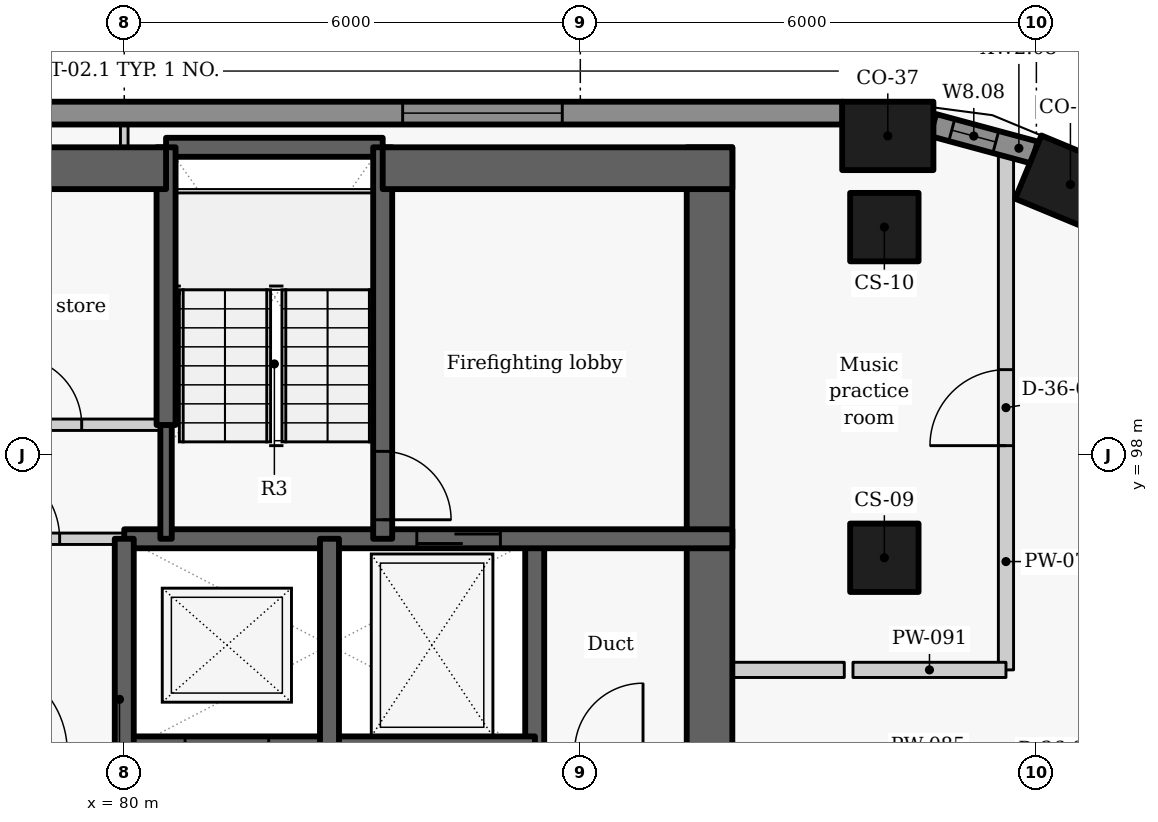
"""IFC4 building model, lengths in metres.
Left out: names, types, materials, properties, quantities, classifications, styles, units other than length and angle.
Written with IfcOpenShell. Run it as: python <this file> out.ifc"""

import sys

from ifc_helpers import new_model, si_unit, direction, frame, frame_2d, origin, origin_2d, place, context, subcontext, project, spatial, rectangle, extrude, element, fill, save


model = new_model("IFC4")
c1 = context("Model", 3, precision=1e-05, world=origin(), true_north=direction((0.0, 1.0)))
c2 = subcontext(c1, "Body", "Model", "MODEL_VIEW")
j1 = project(units=[si_unit("LENGTHUNIT", "METRE"), si_unit("PLANEANGLEUNIT", "RADIAN")], contexts=[c1])
p1 = place(None, origin())
s1 = spatial("IfcSite", under=j1, at=p1, CompositionType="ELEMENT")
p2 = place(p1, origin())
s2 = spatial("IfcBuilding", under=s1, at=p2, CompositionType="ELEMENT")
p3 = place(p2, frame((0.0, 0.0, 216.3)))
s3 = spatial("IfcBuildingStorey", under=s2, at=p3, CompositionType="ELEMENT", Elevation=216.3)
for number, where, z_axis, x_axis in (
    (1, (92.448, 101.56, 0.0), (0.0, 0.0, 1.0), (-0.924, 0.383, 0.0)),
    (2, (90.045, 102.2, 0.0), (0.0, 0.0, 1.0), (-1.0, 0.0, 0.0)),
):
    element("IfcColumn", number, at=place(p3, frame(where, z_axis=z_axis, x_axis=x_axis)), inside=s3, PredefinedType="COLUMN", context=c2, shape_type="SweptSolid", body=[
        extrude(rectangle(XDim=1.2, YDim=0.9, at=origin_2d()), origin(), (0.0, 0.0, 1.0), 3.3),
    ])
for number, where, z_axis, x_axis in (
    (3, (90.0, 96.65, 0.0), (0.0, 0.0, 1.0), (0.0, 1.0, 0.0)),
    (4, (90.0, 101.0, 0.0), (0.0, 0.0, 1.0), (0.0, 1.0, 0.0)),
):
    element("IfcColumn", number, at=place(p3, frame(where, z_axis=z_axis, x_axis=x_axis)), inside=s3, PredefinedType="COLUMN", context=c2, shape_type="SweptSolid", body=[
        extrude(rectangle(XDim=0.9, YDim=0.9, at=origin_2d()), origin(), (0.0, 0.0, 1.0), 3.3),
    ])
p4 = place(p3, frame((91.977, 101.981, 0.0), z_axis=(0.0, 0.0, 1.0), x_axis=(-0.965315341278, 0.261086751661, 0.0)))
e5 = element("IfcWall", 5, at=p4, inside=s3, PredefinedType="SOLIDWALL", context=c2, shape_type="SweptSolid", body=[
    extrude(rectangle(XDim=1.384, YDim=0.3, at=frame_2d((0.692, 0.0))), origin(), (0.0, 0.0, 1.0), 2.05),
])
p5 = place(p4, frame((0.529, 0.0, 0.9)))
e6 = element("IfcOpeningElement", 6, at=p5, cuts=e5, PredefinedType="OPENING", context=c2, shape_type="SweptSolid", body=[
    extrude(rectangle(XDim=0.6, YDim=1.1, at=frame_2d((0.3, 0.55))), frame((0.0, 0.16, 0.0), z_axis=(0.0, -1.0, 0.0), x_axis=(1.0, 0.0, 0.0)), (0.0, 0.0, 1.0), 0.32),
])
p6 = place(p3, frame((89.449, 102.5, 0.0), z_axis=(0.0, 0.0, 1.0), x_axis=(-1.0, 0.0, 0.0)))
e7 = element("IfcWall", 7, at=p6, inside=s3, PredefinedType="SOLIDWALL", context=c2, shape_type="SweptSolid", body=[
    extrude(rectangle(XDim=18.933, YDim=0.3, at=frame_2d((9.466, 0.0))), origin(), (0.0, 0.0, 1.0), 2.05),
])
p7 = place(p6, frame((3.687, 0.0, 0.9)))
e8 = element("IfcOpeningElement", 8, at=p7, cuts=e7, PredefinedType="OPENING", context=c2, shape_type="SweptSolid", body=[
    extrude(rectangle(XDim=2.1, YDim=1.1, at=frame_2d((1.05, 0.55))), frame((0.0, 0.16, 0.0), z_axis=(0.0, -1.0, 0.0), x_axis=(1.0, 0.0, 0.0)), (0.0, 0.0, 1.0), 0.32),
])
p8 = place(p6, frame((13.118, 0.0, 0.9)))
e9 = element("IfcOpeningElement", 9, at=p8, cuts=e7, PredefinedType="OPENING", context=c2, shape_type="SweptSolid", body=[
    extrude(rectangle(XDim=2.1, YDim=1.1, at=frame_2d((1.05, 0.55))), frame((0.0, 0.16, 0.0), z_axis=(0.0, -1.0, 0.0), x_axis=(1.0, 0.0, 0.0)), (0.0, 0.0, 1.0), 0.32),
])
p9 = place(p3, frame((85.4, 94.1, -0.275), z_axis=(0.0, 0.0, 1.0), x_axis=(0.0, 1.0, 0.0)))
e10 = element("IfcWall", 10, at=p9, inside=s3, PredefinedType="SHEAR", context=c2, shape_type="SweptSolid", body=[
    extrude(rectangle(XDim=2.8, YDim=0.25, at=frame_2d((1.4, 0.0))), origin(), (0.0, 0.0, 1.0), 3.225),
])
p10 = place(p3, frame((87.7, 102.05, -0.275), z_axis=(0.0, 0.0, 1.0), x_axis=(0.0, -1.0, 0.0)))
e11 = element("IfcWall", 11, at=p10, inside=s3, PredefinedType="SHEAR", context=c2, shape_type="SweptSolid", body=[
    extrude(rectangle(XDim=14.25, YDim=0.6, at=frame_2d((7.125, 0.0))), origin(), (0.0, 0.0, 1.0), 3.225),
])
p11 = place(p10, frame((8.898, 0.0, 0.275)))
e12 = element("IfcOpeningElement", 12, at=p11, cuts=e11, PredefinedType="OPENING", context=c2, shape_type="SweptSolid", body=[
    extrude(rectangle(XDim=1.5, YDim=2.1, at=frame_2d((0.75, 1.05))), frame((0.0, 0.31, 0.0), z_axis=(0.0, -1.0, 0.0), x_axis=(1.0, 0.0, 0.0)), (0.0, 0.0, 1.0), 0.62),
])
p12 = place(p3, frame((79.997, 94.1, -0.275), z_axis=(0.0, 0.0, 1.0), x_axis=(1.0, 0.0, 0.0)))
e13 = element("IfcWall", 13, at=p12, inside=s3, PredefinedType="SHEAR", context=c2, shape_type="SweptSolid", body=[
    extrude(rectangle(XDim=5.406, YDim=0.4, at=frame_2d((2.703, 0.0))), origin(), (0.0, 0.0, 1.0), 3.225),
])
p13 = place(p12, frame((0.803, 0.0, 0.275)))
e14 = element("IfcOpeningElement", 14, at=p13, cuts=e13, PredefinedType="OPENING", context=c2, shape_type="SweptSolid", body=[
    extrude(rectangle(XDim=1.1, YDim=2.1, at=frame_2d((0.55, 1.05))), frame((0.0, 0.21, 0.0), z_axis=(0.0, -1.0, 0.0), x_axis=(1.0, 0.0, 0.0)), (0.0, 0.0, 1.0), 0.42),
])
p14 = place(p3, frame((80.0, 96.9, -0.275), z_axis=(0.0, 0.0, 1.0), x_axis=(1.0, 0.0, 0.0)))
e15 = element("IfcWall", 15, at=p14, inside=s3, PredefinedType="SHEAR", context=c2, shape_type="SweptSolid", body=[
    extrude(rectangle(XDim=8.0, YDim=0.25, at=frame_2d((4.0, 0.0))), origin(), (0.0, 0.0, 1.0), 3.225),
])
p15 = place(p14, frame((3.849, 0.0, 0.275)))
e16 = element("IfcOpeningElement", 16, at=p15, cuts=e15, PredefinedType="OPENING", context=c2, shape_type="SweptSolid", body=[
    extrude(rectangle(XDim=1.1, YDim=2.1, at=frame_2d((0.55, 1.05))), frame((0.0, 0.135, 0.0), z_axis=(0.0, -1.0, 0.0), x_axis=(1.0, 0.0, 0.0)), (0.0, 0.0, 1.0), 0.27),
])
p16 = place(p3, frame((80.0, 94.1, -0.275), z_axis=(0.0, 0.0, 1.0), x_axis=(0.0, 1.0, 0.0)))
e17 = element("IfcWall", 17, at=p16, inside=s3, PredefinedType="SHEAR", context=c2, shape_type="SweptSolid", body=[
    extrude(rectangle(XDim=2.8, YDim=0.25, at=frame_2d((1.4, 0.0))), origin(), (0.0, 0.0, 1.0), 3.225),
])
p17 = place(p3, frame((77.3, 96.9, 0.0), z_axis=(0.0, 0.0, 1.0), x_axis=(1.0, 0.0, 0.0)))
e18 = element("IfcWall", 18, at=p17, inside=s3, PredefinedType="PARTITIONING", context=c2, shape_type="SweptSolid", body=[
    extrude(rectangle(XDim=2.7, YDim=0.15, at=frame_2d((1.35, 0.0))), origin(), (0.0, 0.0, 1.0), 2.95),
])
p18 = place(p17, frame((0.85, 0.0, 0.0)))
e19 = element("IfcOpeningElement", 19, at=p18, cuts=e18, PredefinedType="OPENING", context=c2, shape_type="SweptSolid", body=[
    extrude(rectangle(XDim=1.0, YDim=2.1, at=frame_2d((0.5, 1.05))), frame((0.0, 0.085, 0.0), z_axis=(0.0, -1.0, 0.0), x_axis=(1.0, 0.0, 0.0)), (0.0, 0.0, 1.0), 0.17),
])
p19 = place(p3, frame((82.7, 94.1, -0.275), z_axis=(0.0, 0.0, 1.0), x_axis=(0.0, 1.0, 0.0)))
e20 = element("IfcWall", 20, at=p19, inside=s3, PredefinedType="SHEAR", context=c2, shape_type="SweptSolid", body=[
    extrude(rectangle(XDim=2.8, YDim=0.25, at=frame_2d((1.4, 0.0))), origin(), (0.0, 0.0, 1.0), 3.225),
])
p20 = place(p3, frame((80.55, 102.05, -0.275), z_axis=(0.0, 0.0, 1.0), x_axis=(1.0, 0.0, 0.0)))
e21 = element("IfcWall", 21, at=p20, inside=s3, PredefinedType="SHEAR", context=c2, shape_type="SweptSolid", body=[
    extrude(rectangle(XDim=2.85, YDim=0.25, at=frame_2d((1.425, 0.0))), origin(), (0.0, 0.0, 1.0), 3.225),
])
p21 = place(p3, frame((83.4, 102.05, -0.275), z_axis=(0.0, 0.0, 1.0), x_axis=(0.0, -1.0, 0.0)))
e22 = element("IfcWall", 22, at=p21, inside=s3, PredefinedType="SHEAR", context=c2, shape_type="SweptSolid", body=[
    extrude(rectangle(XDim=5.15, YDim=0.25, at=frame_2d((2.575, 0.0))), origin(), (0.0, 0.0, 1.0), 3.225),
])
p22 = place(p21, frame((4.0, 0.0, 0.275)))
e23 = element("IfcOpeningElement", 23, at=p22, cuts=e22, PredefinedType="OPENING", context=c2, shape_type="SweptSolid", body=[
    extrude(rectangle(XDim=0.9, YDim=2.1, at=frame_2d((0.45, 1.05))), frame((0.0, 0.135, 0.0), z_axis=(0.0, -1.0, 0.0), x_axis=(1.0, 0.0, 0.0)), (0.0, 0.0, 1.0), 0.27),
])
p23 = place(p3, frame((80.55, 96.9, -0.275), z_axis=(0.0, 0.0, 1.0), x_axis=(0.0, 1.0, 0.0)))
e24 = element("IfcWall", 24, at=p23, inside=s3, PredefinedType="SHEAR", context=c2, shape_type="SweptSolid", body=[
    extrude(rectangle(XDim=1.503, YDim=0.15, at=frame_2d((0.751, 0.0))), origin(), (0.0, 0.0, 1.0), 3.225),
])
p24 = place(p3, frame((80.55, 98.397, -0.275), z_axis=(0.0, 0.0, 1.0), x_axis=(0.0, 1.0, 0.0)))
e25 = element("IfcWall", 25, at=p24, inside=s3, PredefinedType="SHEAR", context=c2, shape_type="SweptSolid", body=[
    extrude(rectangle(XDim=3.653, YDim=0.25, at=frame_2d((1.827, 0.0))), origin(), (0.0, 0.0, 1.0), 3.225),
])
p25 = place(p3, frame((75.35, 101.775, -0.275), z_axis=(0.0, 0.0, 1.0), x_axis=(1.0, 0.0, 0.0)))
e26 = element("IfcWall", 26, at=p25, inside=s3, PredefinedType="SHEAR", context=c2, shape_type="SweptSolid", body=[
    extrude(rectangle(XDim=5.2, YDim=0.55, at=frame_2d((2.6, 0.0))), origin(), (0.0, 0.0, 1.0), 3.225),
])
p26 = place(p3, frame((83.4, 101.775, -0.275), z_axis=(0.0, 0.0, 1.0), x_axis=(1.0, 0.0, 0.0)))
e27 = element("IfcWall", 27, at=p26, inside=s3, PredefinedType="SHEAR", context=c2, shape_type="SweptSolid", body=[
    extrude(rectangle(XDim=4.6, YDim=0.55, at=frame_2d((2.3, 0.0))), origin(), (0.0, 0.0, 1.0), 3.225),
])
p27 = place(p3, frame((75.35, 98.4, 0.0), z_axis=(0.0, 0.0, 1.0), x_axis=(1.0, 0.0, 0.0)))
e28 = element("IfcWall", 28, at=p27, inside=s3, PredefinedType="PARTITIONING", context=c2, shape_type="SweptSolid", body=[
    extrude(rectangle(XDim=5.2, YDim=0.15, at=frame_2d((2.6, 0.0))), origin(), (0.0, 0.0, 1.0), 2.95),
])
p28 = place(p27, frame((0.59, 0.0, 0.0)))
e29 = element("IfcOpeningElement", 29, at=p28, cuts=e28, PredefinedType="OPENING", context=c2, shape_type="SweptSolid", body=[
    extrude(rectangle(XDim=0.9, YDim=2.1, at=frame_2d((0.45, 1.05))), frame((0.0, 0.085, 0.0), z_axis=(0.0, -1.0, 0.0), x_axis=(1.0, 0.0, 0.0)), (0.0, 0.0, 1.0), 0.17),
])
p29 = place(p27, frame((3.19, 0.0, 0.0)))
e30 = element("IfcOpeningElement", 30, at=p29, cuts=e28, PredefinedType="OPENING", context=c2, shape_type="SweptSolid", body=[
    extrude(rectangle(XDim=0.9, YDim=2.1, at=frame_2d((0.45, 1.05))), frame((0.0, 0.085, 0.0), z_axis=(0.0, -1.0, 0.0), x_axis=(1.0, 0.0, 0.0)), (0.0, 0.0, 1.0), 0.17),
])
p30 = place(p3, frame((91.6, 95.175, 0.0), z_axis=(0.0, 0.0, 1.0), x_axis=(0.0, 1.0, 0.0)))
e31 = element("IfcWall", 31, at=p30, inside=s3, PredefinedType="PARTITIONING", context=c2, shape_type="SweptSolid", body=[
    extrude(rectangle(XDim=6.899, YDim=0.2, at=frame_2d((3.449, 0.0))), origin(), (0.0, 0.0, 1.0), 2.03),
])
p31 = place(p30, frame((2.95, 0.0, 0.0)))
e32 = element("IfcOpeningElement", 32, at=p31, cuts=e31, PredefinedType="OPENING", context=c2, shape_type="SweptSolid", body=[
    extrude(rectangle(XDim=1.0, YDim=2.01, at=frame_2d((0.5, 1.005))), frame((0.0, 0.11, 0.0), z_axis=(0.0, -1.0, 0.0), x_axis=(1.0, 0.0, 0.0)), (0.0, 0.0, 1.0), 0.22),
])
p32 = place(p3, frame((88.0, 95.175, 0.0), z_axis=(0.0, 0.0, 1.0), x_axis=(1.0, 0.0, 0.0)))
e33 = element("IfcWall", 33, at=p32, inside=s3, PredefinedType="PARTITIONING", context=c2, shape_type="SweptSolid", body=[
    extrude(rectangle(XDim=1.473, YDim=0.2, at=frame_2d((0.736, 0.0))), origin(), (0.0, 0.0, 1.0), 2.95),
])
p33 = place(p3, frame((89.587, 95.175, 0.0), z_axis=(0.0, 0.0, 1.0), x_axis=(1.0, 0.0, 0.0)))
e34 = element("IfcWall", 34, at=p33, inside=s3, PredefinedType="PARTITIONING", context=c2, shape_type="SweptSolid", body=[
    extrude(rectangle(XDim=2.013, YDim=0.2, at=frame_2d((1.006, 0.0))), origin(), (0.0, 0.0, 1.0), 2.43),
])
p34 = place(p3, frame((80.0, 102.05, 0.0), z_axis=(0.0, 0.0, 1.0), x_axis=(0.0, 1.0, 0.0)))
e35 = element("IfcWall", 35, at=p34, inside=s3, PredefinedType="PARTITIONING", context=c2, shape_type="SweptSolid", body=[
    extrude(rectangle(XDim=0.3, YDim=0.1, at=frame_2d((0.15, 0.0))), origin(), (0.0, 0.0, 1.0), 2.95),
])
p35 = place(p5, origin())
e36 = element("IfcWindow", 36, at=p35, inside=s3, PartitioningType="SINGLE_PANEL", PredefinedType="WINDOW", context=c2, shape_type="SweptSolid", body=[
    extrude(rectangle(XDim=0.6, YDim=1.1, at=frame_2d((0.3, 0.55))), frame((0.0, 0.03, 0.0), z_axis=(0.0, -1.0, 0.0), x_axis=(1.0, 0.0, 0.0)), (0.0, 0.0, 1.0), 0.06),
])
fill(e6, e36)
p36 = place(p7, origin())
e37 = element("IfcWindow", 37, at=p36, inside=s3, PartitioningType="SINGLE_PANEL", PredefinedType="WINDOW", context=c2, shape_type="SweptSolid", body=[
    extrude(rectangle(XDim=2.1, YDim=1.1, at=frame_2d((1.05, 0.55))), frame((0.0, 0.03, 0.0), z_axis=(0.0, -1.0, 0.0), x_axis=(1.0, 0.0, 0.0)), (0.0, 0.0, 1.0), 0.06),
])
fill(e8, e37)
p37 = place(p15, origin())
e38 = element("IfcDoor", 38, at=p37, inside=s3, OperationType="SLIDING_TO_LEFT", PredefinedType="DOOR", context=c2, shape_type="SweptSolid", body=[
    extrude(rectangle(XDim=1.1, YDim=2.1, at=frame_2d((0.55, 1.05))), frame((0.0, 0.025, 0.0), z_axis=(0.0, -1.0, 0.0), x_axis=(1.0, 0.0, 0.0)), (0.0, 0.0, 1.0), 0.05),
])
fill(e16, e38)
p38 = place(p18, origin())
e39 = element("IfcDoor", 39, at=p38, inside=s3, OperationType="SINGLE_SWING_LEFT", PredefinedType="DOOR", context=c2, shape_type="SweptSolid", body=[
    extrude(rectangle(XDim=1.0, YDim=2.1, at=frame_2d((0.5, 1.05))), frame((0.0, 0.025, 0.0), z_axis=(0.0, -1.0, 0.0), x_axis=(1.0, 0.0, 0.0)), (0.0, 0.0, 1.0), 0.05),
])
fill(e19, e39)
p39 = place(p29, origin())
e40 = element("IfcDoor", 40, at=p39, inside=s3, OperationType="SINGLE_SWING_LEFT", PredefinedType="DOOR", context=c2, shape_type="SweptSolid", body=[
    extrude(rectangle(XDim=0.9, YDim=2.1, at=frame_2d((0.45, 1.05))), frame((0.0, 0.025, 0.0), z_axis=(0.0, -1.0, 0.0), x_axis=(1.0, 0.0, 0.0)), (0.0, 0.0, 1.0), 0.05),
])
fill(e30, e40)
p40 = place(p22, origin())
e41 = element("IfcDoor", 41, at=p40, inside=s3, OperationType="SINGLE_SWING_RIGHT", PredefinedType="DOOR", context=c2, shape_type="SweptSolid", body=[
    extrude(rectangle(XDim=0.9, YDim=2.1, at=frame_2d((0.45, 1.05))), frame((0.0, 0.025, 0.0), z_axis=(0.0, -1.0, 0.0), x_axis=(1.0, 0.0, 0.0)), (0.0, 0.0, 1.0), 0.05),
])
fill(e23, e41)
p41 = place(p31, origin())
e42 = element("IfcDoor", 42, at=p41, inside=s3, OperationType="SINGLE_SWING_LEFT", PredefinedType="DOOR", context=c2, shape_type="SweptSolid", body=[
    extrude(rectangle(XDim=1.0, YDim=2.01, at=frame_2d((0.5, 1.005))), frame((0.0, 0.025, 0.0), z_axis=(0.0, -1.0, 0.0), x_axis=(1.0, 0.0, 0.0)), (0.0, 0.0, 1.0), 0.05),
])
fill(e32, e42)
save(model, sys.argv[1])
